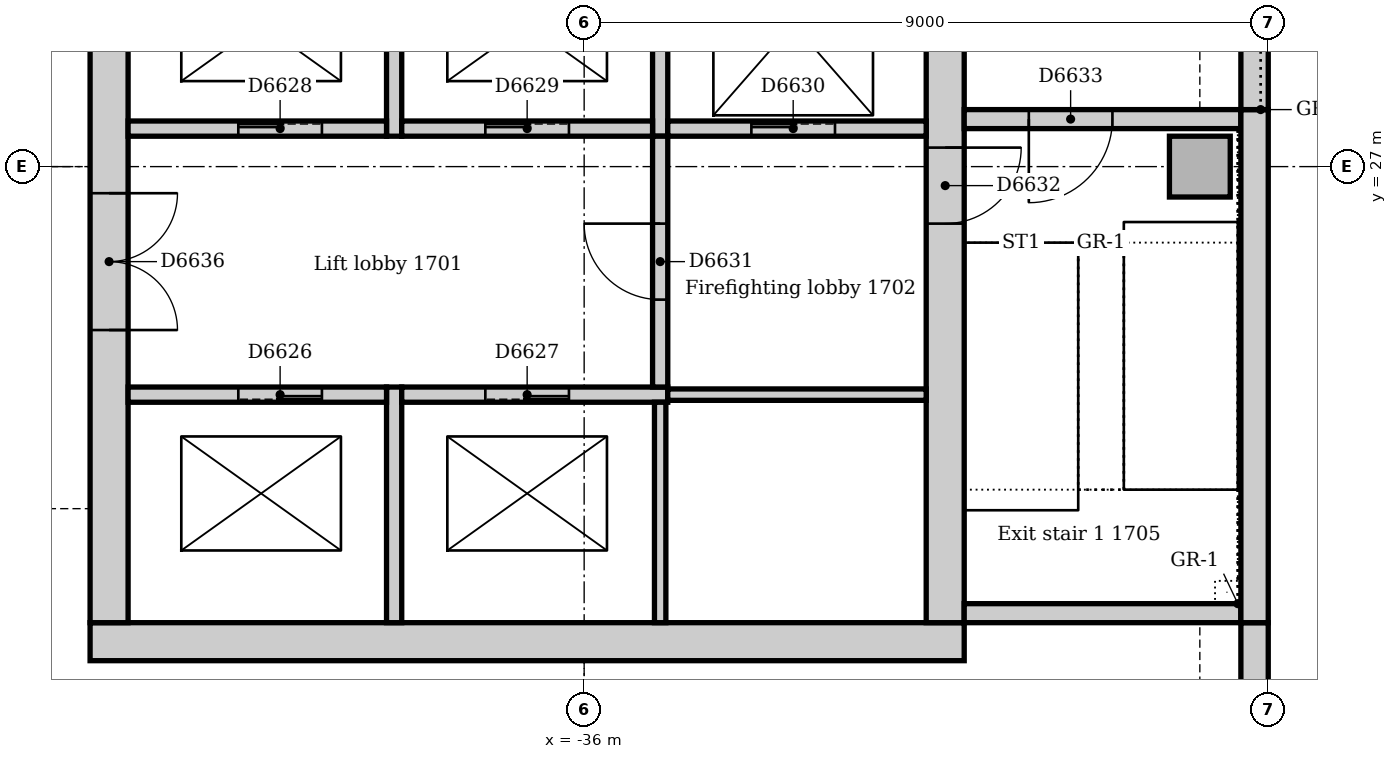
"""IFC4 building model, lengths in metres.
Left out: names, types, materials, properties, quantities, classifications, styles, units other than length and angle.
Written with IfcOpenShell. Run it as: python <this file> out.ifc"""

import sys

from ifc_helpers import new_model, si_unit, direction, frame, frame_2d, origin, origin_2d, place, context, subcontext, project, spatial, rectangle, extrude, element, fill, save


model = new_model("IFC4")
c1 = context("Model", 3, precision=1e-05, world=origin(), true_north=direction((0.0, 1.0)))
c2 = subcontext(c1, "Body", "Model", "MODEL_VIEW")
j1 = project(units=[si_unit("LENGTHUNIT", "METRE"), si_unit("PLANEANGLEUNIT", "RADIAN")], contexts=[c1])
p1 = place(None, origin())
s1 = spatial("IfcSite", under=j1, at=p1, CompositionType="ELEMENT")
p2 = place(p1, origin())
s2 = spatial("IfcBuilding", under=s1, at=p2, CompositionType="ELEMENT")
p3 = place(p2, frame((0.0, 0.0, 75.0)))
s3 = spatial("IfcBuildingStorey", under=s2, at=p3, CompositionType="ELEMENT", Elevation=75.0)
p4 = place(p3, frame((-42.5, 20.75, 0.0), z_axis=(0.0, 0.0, 1.0), x_axis=(1.0, 0.0, 0.0)))
e1 = element("IfcWall", 1, at=p4, inside=s3, PredefinedType="SOLIDWALL", context=c2, shape_type="SweptSolid", body=[
    extrude(rectangle(XDim=11.5, YDim=0.5, at=frame_2d((5.75, 0.0))), origin(), (0.0, 0.0, 1.0), 4.0),
])
p5 = place(p3, frame((-31.25, 21.0, 0.0), z_axis=(0.0, 0.0, 1.0), x_axis=(0.0, 1.0, 0.0)))
e2 = element("IfcWall", 2, at=p5, inside=s3, PredefinedType="SOLIDWALL", context=c2, shape_type="SweptSolid", body=[
    extrude(rectangle(XDim=9.5, YDim=0.5, at=frame_2d((4.75, 0.0))), origin(), (0.0, 0.0, 1.0), 4.0),
])
p6 = place(p5, frame((5.25, 0.0, 0.0)))
e3 = element("IfcOpeningElement", 3, at=p6, cuts=e2, PredefinedType="OPENING", context=c2, shape_type="SweptSolid", body=[
    extrude(rectangle(XDim=1.0, YDim=2.1, at=frame_2d((0.5, 1.05))), frame((0.0, 0.26, 0.0), z_axis=(0.0, -1.0, 0.0), x_axis=(1.0, 0.0, 0.0)), (0.0, 0.0, 1.0), 0.52),
])
p7 = place(p3, frame((-42.25, 30.5, 0.0), z_axis=(0.0, 0.0, 1.0), x_axis=(0.0, -1.0, 0.0)))
e4 = element("IfcWall", 4, at=p7, inside=s3, PredefinedType="SOLIDWALL", context=c2, shape_type="SweptSolid", body=[
    extrude(rectangle(XDim=9.5, YDim=0.5, at=frame_2d((4.75, 0.0))), origin(), (0.0, 0.0, 1.0), 4.0),
])
p8 = place(p7, frame((3.85, 0.0, 0.0)))
e5 = element("IfcOpeningElement", 5, at=p8, cuts=e4, PredefinedType="OPENING", context=c2, shape_type="SweptSolid", body=[
    extrude(rectangle(XDim=1.8, YDim=2.1, at=frame_2d((0.9, 1.05))), frame((0.0, 0.26, 0.0), z_axis=(0.0, -1.0, 0.0), x_axis=(1.0, 0.0, 0.0)), (0.0, 0.0, 1.0), 0.52),
])
p9 = place(p3, frame((-31.0, 21.125, 0.0), z_axis=(0.0, 0.0, 1.0), x_axis=(1.0, 0.0, 0.0)))
e6 = element("IfcWall", 6, at=p9, inside=s3, PredefinedType="SOLIDWALL", context=c2, shape_type="SweptSolid", body=[
    extrude(rectangle(XDim=3.64, YDim=0.25, at=frame_2d((1.82, 0.0))), origin(), (0.0, 0.0, 1.0), 4.0),
])
p10 = place(p3, frame((-27.36, 27.625, 0.0), z_axis=(0.0, 0.0, 1.0), x_axis=(-1.0, 0.0, 0.0)))
e7 = element("IfcWall", 7, at=p10, inside=s3, PredefinedType="SOLIDWALL", context=c2, shape_type="SweptSolid", body=[
    extrude(rectangle(XDim=3.64, YDim=0.25, at=frame_2d((1.82, 0.0))), origin(), (0.0, 0.0, 1.0), 4.0),
])
p11 = place(p10, frame((1.69, 0.0, 0.0)))
e8 = element("IfcOpeningElement", 8, at=p11, cuts=e7, PredefinedType="OPENING", context=c2, shape_type="SweptSolid", body=[
    extrude(rectangle(XDim=1.1, YDim=2.1, at=frame_2d((0.55, 1.05))), frame((0.0, 0.135, 0.0), z_axis=(0.0, -1.0, 0.0), x_axis=(1.0, 0.0, 0.0)), (0.0, 0.0, 1.0), 0.27),
])
p12 = place(p3, frame((-27.9, 27.0, 0.0), z_axis=(0.0, 0.0, 1.0), x_axis=(1.0, 0.0, 0.0)))
e9 = element("IfcColumn", 9, at=p12, inside=s3, PredefinedType="COLUMN", context=c2, shape_type="SweptSolid", body=[
    extrude(rectangle(XDim=0.8, YDim=0.8, at=origin_2d()), origin(), (0.0, 0.0, 1.0), 4.0),
])
p13 = place(p3, frame((-27.18, 13.243, 0.0), z_axis=(0.0, 0.0, 1.0), x_axis=(0.0, 1.0, 0.0)))
e10 = element("IfcWall", 10, at=p13, inside=s3, PredefinedType="STANDARD", context=c2, shape_type="SweptSolid", body=[
    extrude(rectangle(XDim=7.757, YDim=0.36, at=frame_2d((3.879, 0.0))), origin(), (0.0, 0.0, 1.0), 3.85),
])
p14 = place(p13, frame((1.982, 0.0, 0.9)))
e11 = element("IfcOpeningElement", 11, at=p14, cuts=e10, PredefinedType="OPENING", context=c2, shape_type="SweptSolid", body=[
    extrude(rectangle(XDim=3.3, YDim=1.6, at=frame_2d((1.65, 0.8))), frame((0.0, 0.19, 0.0), z_axis=(0.0, -1.0, 0.0), x_axis=(1.0, 0.0, 0.0)), (0.0, 0.0, 1.0), 0.38),
])
p15 = place(p3, frame((-27.18, 21.0, 0.0), z_axis=(0.0, 0.0, 1.0), x_axis=(0.0, 1.0, 0.0)))
e12 = element("IfcWall", 12, at=p15, inside=s3, PredefinedType="STANDARD", context=c2, shape_type="SweptSolid", body=[
    extrude(rectangle(XDim=6.75, YDim=0.36, at=frame_2d((3.375, 0.0))), origin(), (0.0, 0.0, 1.0), 3.85),
])
p16 = place(p3, frame((-27.18, 27.75, 0.0), z_axis=(0.0, 0.0, 1.0), x_axis=(0.0, 1.0, 0.0)))
e13 = element("IfcWall", 13, at=p16, inside=s3, PredefinedType="STANDARD", context=c2, shape_type="SweptSolid", body=[
    extrude(rectangle(XDim=7.5, YDim=0.36, at=frame_2d((3.75, 0.0))), origin(), (0.0, 0.0, 1.0), 3.85),
])
p17 = place(p16, frame((2.85, 0.0, 1.2)))
e14 = element("IfcOpeningElement", 14, at=p17, cuts=e13, PredefinedType="OPENING", context=c2, shape_type="SweptSolid", body=[
    extrude(rectangle(XDim=1.8, YDim=1.2, at=frame_2d((0.9, 0.6))), frame((0.0, 0.19, 0.0), z_axis=(0.0, -1.0, 0.0), x_axis=(1.0, 0.0, 0.0)), (0.0, 0.0, 1.0), 0.38),
])
p18 = place(p3, frame((-38.5, 21.0, 0.0), z_axis=(0.0, 0.0, 1.0), x_axis=(0.0, 1.0, 0.0)))
e15 = element("IfcWall", 15, at=p18, inside=s3, PredefinedType="SOLIDWALL", context=c2, shape_type="SweptSolid", body=[
    extrude(rectangle(XDim=3.1, YDim=0.2, at=frame_2d((1.55, 0.0))), origin(), (0.0, 0.0, 1.0), 4.0),
])
p19 = place(p3, frame((-38.6, 24.0, 0.0), z_axis=(0.0, 0.0, 1.0), x_axis=(-1.0, 0.0, 0.0)))
e16 = element("IfcWall", 16, at=p19, inside=s3, PredefinedType="SOLIDWALL", context=c2, shape_type="SweptSolid", body=[
    extrude(rectangle(XDim=3.4, YDim=0.2, at=frame_2d((1.7, 0.0))), origin(), (0.0, 0.0, 1.0), 4.0),
])
p20 = place(p19, frame((0.85, 0.0, 0.0)))
e17 = element("IfcOpeningElement", 17, at=p20, cuts=e16, PredefinedType="OPENING", context=c2, shape_type="SweptSolid", body=[
    extrude(rectangle(XDim=1.1, YDim=2.1, at=frame_2d((0.55, 1.05))), frame((0.0, 0.11, 0.0), z_axis=(0.0, -1.0, 0.0), x_axis=(1.0, 0.0, 0.0)), (0.0, 0.0, 1.0), 0.22),
])
p21 = place(p3, frame((-34.9, 24.0, 0.0), z_axis=(0.0, 0.0, 1.0), x_axis=(-1.0, 0.0, 0.0)))
e18 = element("IfcWall", 18, at=p21, inside=s3, PredefinedType="SOLIDWALL", context=c2, shape_type="SweptSolid", body=[
    extrude(rectangle(XDim=3.5, YDim=0.2, at=frame_2d((1.75, 0.0))), origin(), (0.0, 0.0, 1.0), 4.0),
])
p22 = place(p21, frame((1.3, 0.0, 0.0)))
e19 = element("IfcOpeningElement", 19, at=p22, cuts=e18, PredefinedType="OPENING", context=c2, shape_type="SweptSolid", body=[
    extrude(rectangle(XDim=1.1, YDim=2.1, at=frame_2d((0.55, 1.05))), frame((0.0, 0.11, 0.0), z_axis=(0.0, -1.0, 0.0), x_axis=(1.0, 0.0, 0.0)), (0.0, 0.0, 1.0), 0.22),
])
p23 = place(p3, frame((-38.5, 27.4, 0.0), z_axis=(0.0, 0.0, 1.0), x_axis=(0.0, 1.0, 0.0)))
e20 = element("IfcWall", 20, at=p23, inside=s3, PredefinedType="SOLIDWALL", context=c2, shape_type="SweptSolid", body=[
    extrude(rectangle(XDim=2.85, YDim=0.2, at=frame_2d((1.425, 0.0))), origin(), (0.0, 0.0, 1.0), 4.0),
])
p24 = place(p3, frame((-42.0, 27.5, 0.0), z_axis=(0.0, 0.0, 1.0), x_axis=(1.0, 0.0, 0.0)))
e21 = element("IfcWall", 21, at=p24, inside=s3, PredefinedType="SOLIDWALL", context=c2, shape_type="SweptSolid", body=[
    extrude(rectangle(XDim=3.4, YDim=0.2, at=frame_2d((1.7, 0.0))), origin(), (0.0, 0.0, 1.0), 4.0),
])
p25 = place(p24, frame((1.45, 0.0, 0.0)))
e22 = element("IfcOpeningElement", 22, at=p25, cuts=e21, PredefinedType="OPENING", context=c2, shape_type="SweptSolid", body=[
    extrude(rectangle(XDim=1.1, YDim=2.1, at=frame_2d((0.55, 1.05))), frame((0.0, 0.11, 0.0), z_axis=(0.0, -1.0, 0.0), x_axis=(1.0, 0.0, 0.0)), (0.0, 0.0, 1.0), 0.22),
])
p26 = place(p3, frame((-35.0, 27.4, 0.0), z_axis=(0.0, 0.0, 1.0), x_axis=(0.0, 1.0, 0.0)))
e23 = element("IfcWall", 23, at=p26, inside=s3, PredefinedType="SOLIDWALL", context=c2, shape_type="SweptSolid", body=[
    extrude(rectangle(XDim=2.85, YDim=0.2, at=frame_2d((1.425, 0.0))), origin(), (0.0, 0.0, 1.0), 4.0),
])
p27 = place(p3, frame((-38.4, 27.5, 0.0), z_axis=(0.0, 0.0, 1.0), x_axis=(1.0, 0.0, 0.0)))
e24 = element("IfcWall", 24, at=p27, inside=s3, PredefinedType="SOLIDWALL", context=c2, shape_type="SweptSolid", body=[
    extrude(rectangle(XDim=3.3, YDim=0.2, at=frame_2d((1.65, 0.0))), origin(), (0.0, 0.0, 1.0), 4.0),
])
p28 = place(p27, frame((1.1, 0.0, 0.0)))
e25 = element("IfcOpeningElement", 25, at=p28, cuts=e24, PredefinedType="OPENING", context=c2, shape_type="SweptSolid", body=[
    extrude(rectangle(XDim=1.1, YDim=2.1, at=frame_2d((0.55, 1.05))), frame((0.0, 0.11, 0.0), z_axis=(0.0, -1.0, 0.0), x_axis=(1.0, 0.0, 0.0)), (0.0, 0.0, 1.0), 0.22),
])
p29 = place(p3, frame((-34.9, 27.5, 0.0), z_axis=(0.0, 0.0, 1.0), x_axis=(1.0, 0.0, 0.0)))
e26 = element("IfcWall", 26, at=p29, inside=s3, PredefinedType="SOLIDWALL", context=c2, shape_type="SweptSolid", body=[
    extrude(rectangle(XDim=3.4, YDim=0.2, at=frame_2d((1.7, 0.0))), origin(), (0.0, 0.0, 1.0), 4.0),
])
p30 = place(p29, frame((1.1, 0.0, 0.0)))
e27 = element("IfcOpeningElement", 27, at=p30, cuts=e26, PredefinedType="OPENING", context=c2, shape_type="SweptSolid", body=[
    extrude(rectangle(XDim=1.1, YDim=2.1, at=frame_2d((0.55, 1.05))), frame((0.0, 0.11, 0.0), z_axis=(0.0, -1.0, 0.0), x_axis=(1.0, 0.0, 0.0)), (0.0, 0.0, 1.0), 0.22),
])
p31 = place(p3, frame((-35.0, 24.1, 0.0), z_axis=(0.0, 0.0, 1.0), x_axis=(0.0, 1.0, 0.0)))
e28 = element("IfcWall", 28, at=p31, inside=s3, PredefinedType="SOLIDWALL", context=c2, shape_type="SweptSolid", body=[
    extrude(rectangle(XDim=3.3, YDim=0.2, at=frame_2d((1.65, 0.0))), origin(), (0.0, 0.0, 1.0), 4.0),
])
p32 = place(p31, frame((1.15, 0.0, 0.0)))
e29 = element("IfcOpeningElement", 29, at=p32, cuts=e28, PredefinedType="OPENING", context=c2, shape_type="SweptSolid", body=[
    extrude(rectangle(XDim=1.0, YDim=2.1, at=frame_2d((0.5, 1.05))), frame((0.0, 0.11, 0.0), z_axis=(0.0, -1.0, 0.0), x_axis=(1.0, 0.0, 0.0)), (0.0, 0.0, 1.0), 0.22),
])
p33 = place(p3, frame((-35.0, 21.0, 0.0), z_axis=(0.0, 0.0, 1.0), x_axis=(0.0, 1.0, 0.0)))
e30 = element("IfcWall", 30, at=p33, inside=s3, PredefinedType="SOLIDWALL", context=c2, shape_type="SweptSolid", body=[
    extrude(rectangle(XDim=2.9, YDim=0.15, at=frame_2d((1.45, 0.0))), origin(), (0.0, 0.0, 1.0), 4.0),
])
p34 = place(p3, frame((-31.5, 24.0, 0.0), z_axis=(0.0, 0.0, 1.0), x_axis=(-1.0, 0.0, 0.0)))
e31 = element("IfcWall", 31, at=p34, inside=s3, PredefinedType="SOLIDWALL", context=c2, shape_type="SweptSolid", body=[
    extrude(rectangle(XDim=3.4, YDim=0.15, at=frame_2d((1.7, 0.0))), origin(), (0.0, 0.0, 1.0), 4.0),
])
p35 = place(p20, origin())
e32 = element("IfcDoor", 32, at=p35, inside=s3, OperationType="SLIDING_TO_LEFT", PredefinedType="DOOR", context=c2, shape_type="SweptSolid", body=[
    extrude(rectangle(XDim=1.1, YDim=2.1, at=frame_2d((0.55, 1.05))), frame((0.0, 0.025, 0.0), z_axis=(0.0, -1.0, 0.0), x_axis=(1.0, 0.0, 0.0)), (0.0, 0.0, 1.0), 0.05),
])
fill(e17, e32)
p36 = place(p22, origin())
e33 = element("IfcDoor", 33, at=p36, inside=s3, OperationType="SLIDING_TO_LEFT", PredefinedType="DOOR", context=c2, shape_type="SweptSolid", body=[
    extrude(rectangle(XDim=1.1, YDim=2.1, at=frame_2d((0.55, 1.05))), frame((0.0, 0.025, 0.0), z_axis=(0.0, -1.0, 0.0), x_axis=(1.0, 0.0, 0.0)), (0.0, 0.0, 1.0), 0.05),
])
fill(e19, e33)
p37 = place(p25, origin())
e34 = element("IfcDoor", 34, at=p37, inside=s3, OperationType="SLIDING_TO_LEFT", PredefinedType="DOOR", context=c2, shape_type="SweptSolid", body=[
    extrude(rectangle(XDim=1.1, YDim=2.1, at=frame_2d((0.55, 1.05))), frame((0.0, 0.025, 0.0), z_axis=(0.0, -1.0, 0.0), x_axis=(1.0, 0.0, 0.0)), (0.0, 0.0, 1.0), 0.05),
])
fill(e22, e34)
p38 = place(p28, origin())
e35 = element("IfcDoor", 35, at=p38, inside=s3, OperationType="SLIDING_TO_LEFT", PredefinedType="DOOR", context=c2, shape_type="SweptSolid", body=[
    extrude(rectangle(XDim=1.1, YDim=2.1, at=frame_2d((0.55, 1.05))), frame((0.0, 0.025, 0.0), z_axis=(0.0, -1.0, 0.0), x_axis=(1.0, 0.0, 0.0)), (0.0, 0.0, 1.0), 0.05),
])
fill(e25, e35)
p39 = place(p30, origin())
e36 = element("IfcDoor", 36, at=p39, inside=s3, OperationType="SLIDING_TO_LEFT", PredefinedType="DOOR", context=c2, shape_type="SweptSolid", body=[
    extrude(rectangle(XDim=1.1, YDim=2.1, at=frame_2d((0.55, 1.05))), frame((0.0, 0.025, 0.0), z_axis=(0.0, -1.0, 0.0), x_axis=(1.0, 0.0, 0.0)), (0.0, 0.0, 1.0), 0.05),
])
fill(e27, e36)
p40 = place(p32, origin())
e37 = element("IfcDoor", 37, at=p40, inside=s3, OperationType="SINGLE_SWING_RIGHT", PredefinedType="DOOR", context=c2, shape_type="SweptSolid", body=[
    extrude(rectangle(XDim=1.0, YDim=2.1, at=frame_2d((0.5, 1.05))), frame((0.0, 0.025, 0.0), z_axis=(0.0, -1.0, 0.0), x_axis=(1.0, 0.0, 0.0)), (0.0, 0.0, 1.0), 0.05),
])
fill(e29, e37)
p41 = place(p6, frame((1.0, 0.0, 0.0), z_axis=(0.0, 0.0, 1.0), x_axis=(-1.0, 0.0, 0.0)))
e38 = element("IfcDoor", 38, at=p41, inside=s3, OperationType="SINGLE_SWING_LEFT", PredefinedType="DOOR", context=c2, shape_type="SweptSolid", body=[
    extrude(rectangle(XDim=1.0, YDim=2.1, at=frame_2d((0.5, 1.05))), frame((0.0, 0.025, 0.0), z_axis=(0.0, -1.0, 0.0), x_axis=(1.0, 0.0, 0.0)), (0.0, 0.0, 1.0), 0.05),
])
fill(e3, e38)
p42 = place(p11, origin())
e39 = element("IfcDoor", 39, at=p42, inside=s3, OperationType="SINGLE_SWING_RIGHT", PredefinedType="DOOR", context=c2, shape_type="SweptSolid", body=[
    extrude(rectangle(XDim=1.1, YDim=2.1, at=frame_2d((0.55, 1.05))), frame((0.0, 0.025, 0.0), z_axis=(0.0, -1.0, 0.0), x_axis=(1.0, 0.0, 0.0)), (0.0, 0.0, 1.0), 0.05),
])
fill(e8, e39)
p43 = place(p8, origin())
e40 = element("IfcDoor", 40, at=p43, inside=s3, OperationType="DOUBLE_DOOR_SINGLE_SWING", PredefinedType="DOOR", context=c2, shape_type="SweptSolid", body=[
    extrude(rectangle(XDim=1.8, YDim=2.1, at=frame_2d((0.9, 1.05))), frame((0.0, 0.025, 0.0), z_axis=(0.0, -1.0, 0.0), x_axis=(1.0, 0.0, 0.0)), (0.0, 0.0, 1.0), 0.05),
])
fill(e5, e40)
save(model, sys.argv[1])
